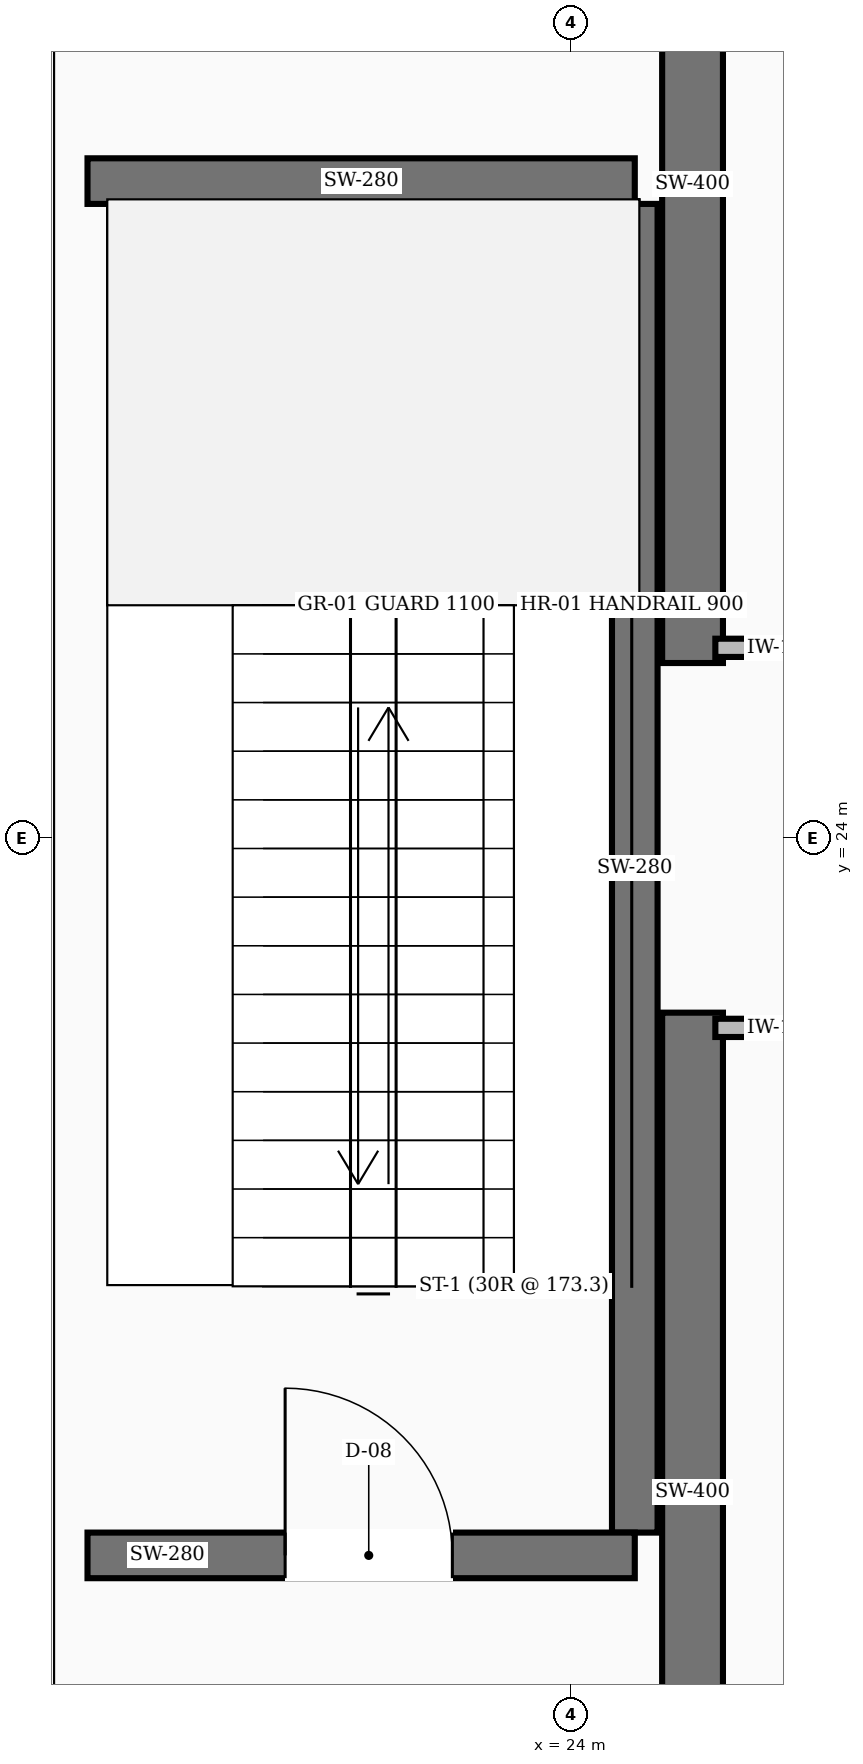
"""IFC4 building model, lengths in metres.
Left out: names, types, materials, properties, quantities, classifications, styles, units other than length and angle.
Written with IfcOpenShell. Run it as: python <this file> out.ifc"""

import sys

from ifc_helpers import new_model, si_unit, direction, frame, frame_2d, origin, place, context, subcontext, project, spatial, rectangle, extrude, element, fill, save


model = new_model("IFC4")
c1 = context("Model", 3, precision=1e-05, world=origin(), true_north=direction((0.0, 1.0)))
c2 = subcontext(c1, "Body", "Model", "MODEL_VIEW")
j1 = project(units=[si_unit("LENGTHUNIT", "METRE"), si_unit("PLANEANGLEUNIT", "RADIAN")], contexts=[c1])
p1 = place(None, origin())
s1 = spatial("IfcSite", under=j1, at=p1, CompositionType="ELEMENT")
p2 = place(p1, origin())
s2 = spatial("IfcBuilding", under=s1, at=p2, CompositionType="ELEMENT")
p3 = place(p2, frame((0.0, 0.0, -10.4)))
s3 = spatial("IfcBuildingStorey", under=s2, at=p3, CompositionType="ELEMENT", Elevation=-10.4)
for number, where, z_axis, x_axis in (
    (1, (24.8, 16.55, 0.0), (0.0, 0.0, 1.0), (0.0, 1.0, 0.0)),
    (2, (24.8, 25.15, 0.0), (0.0, 0.0, 1.0), (0.0, 1.0, 0.0)),
):
    element("IfcWall", number, at=place(p3, frame(where, z_axis=z_axis, x_axis=x_axis)), inside=s3, PredefinedType="SHEAR", context=c2, shape_type="SweptSolid", body=[
        extrude(rectangle(XDim=6.3, YDim=0.4, at=frame_2d((3.15, 0.0))), origin(), (0.0, 0.0, 1.0), 5.2),
    ])
for number, where, z_axis, x_axis in (
    (3, (20.82, 19.43, 0.0), (0.0, 0.0, 1.0), (0.0, 1.0, 0.0)),
    (4, (24.42, 19.43, 0.0), (0.0, 0.0, 1.0), (0.0, 1.0, 0.0)),
):
    element("IfcWall", number, at=place(p3, frame(where, z_axis=z_axis, x_axis=x_axis)), inside=s3, PredefinedType="SHEAR", context=c2, shape_type="SweptSolid", body=[
        extrude(rectangle(XDim=8.74, YDim=0.3, at=frame_2d((4.37, 0.0))), origin(), (0.0, 0.0, 1.0), 5.2),
    ])
p4 = place(p3, frame((20.82, 19.28, 0.0), z_axis=(0.0, 0.0, 1.0), x_axis=(1.0, 0.0, 0.0)))
e5 = element("IfcWall", 5, at=p4, inside=s3, PredefinedType="SHEAR", context=c2, shape_type="SweptSolid", body=[
    extrude(rectangle(XDim=3.6, YDim=0.3, at=frame_2d((1.8, 0.0))), origin(), (0.0, 0.0, 1.0), 5.2),
])
p5 = place(p4, frame((1.3, 0.0, 0.0)))
e6 = element("IfcOpeningElement", 6, at=p5, cuts=e5, PredefinedType="OPENING", context=c2, shape_type="SweptSolid", body=[
    extrude(rectangle(XDim=1.1, YDim=2.1, at=frame_2d((0.55, 1.05))), frame((0.0, 0.16, 0.0), z_axis=(0.0, -1.0, 0.0), x_axis=(1.0, 0.0, 0.0)), (0.0, 0.0, 1.0), 0.32),
])
p6 = place(p3, frame((20.82, 28.32, 0.0), z_axis=(0.0, 0.0, 1.0), x_axis=(1.0, 0.0, 0.0)))
e7 = element("IfcWall", 7, at=p6, inside=s3, PredefinedType="SHEAR", context=c2, shape_type="SweptSolid", body=[
    extrude(rectangle(XDim=3.6, YDim=0.3, at=frame_2d((1.8, 0.0))), origin(), (0.0, 0.0, 1.0), 5.2),
])
p7 = place(p3, frame((20.82, 16.55, 0.0), z_axis=(0.0, 0.0, 1.0), x_axis=(0.0, 1.0, 0.0)))
e8 = element("IfcWall", 8, at=p7, inside=s3, PredefinedType="SOLIDWALL", context=c2, shape_type="SweptSolid", body=[
    extrude(rectangle(XDim=2.73, YDim=0.2, at=frame_2d((1.365, 0.0))), origin(), (0.0, 0.0, 1.0), 3.9),
])
p8 = place(p7, frame((0.815, 0.0, 0.0)))
e9 = element("IfcOpeningElement", 9, at=p8, cuts=e8, PredefinedType="OPENING", context=c2, shape_type="SweptSolid", body=[
    extrude(rectangle(XDim=1.1, YDim=2.1, at=frame_2d((0.55, 1.05))), frame((0.0, 0.11, 0.0), z_axis=(0.0, -1.0, 0.0), x_axis=(1.0, 0.0, 0.0)), (0.0, 0.0, 1.0), 0.22),
])
p9 = place(p3, frame((20.82, 28.32, 0.0), z_axis=(0.0, 0.0, 1.0), x_axis=(0.0, 1.0, 0.0)))
e10 = element("IfcWall", 10, at=p9, inside=s3, PredefinedType="SOLIDWALL", context=c2, shape_type="SweptSolid", body=[
    extrude(rectangle(XDim=3.13, YDim=0.2, at=frame_2d((1.565, 0.0))), origin(), (0.0, 0.0, 1.0), 3.9),
])
p10 = place(p9, frame((1.09, 0.0, 0.0)))
e11 = element("IfcOpeningElement", 11, at=p10, cuts=e10, PredefinedType="OPENING", context=c2, shape_type="SweptSolid", body=[
    extrude(rectangle(XDim=0.95, YDim=2.1, at=frame_2d((0.475, 1.05))), frame((0.0, 0.11, 0.0), z_axis=(0.0, -1.0, 0.0), x_axis=(1.0, 0.0, 0.0)), (0.0, 0.0, 1.0), 0.22),
])
p11 = place(p3, frame((24.95, 25.25, 0.0), z_axis=(0.0, 0.0, 1.0), x_axis=(1.0, 0.0, 0.0)))
e12 = element("IfcWall", 12, at=p11, inside=s3, PredefinedType="PARTITIONING", context=c2, shape_type="SweptSolid", body=[
    extrude(rectangle(XDim=3.2, YDim=0.12, at=frame_2d((1.6, 0.0))), origin(), (0.0, 0.0, 1.0), 3.9),
])
p12 = place(p11, frame((1.125, 0.0, 0.0)))
e13 = element("IfcOpeningElement", 13, at=p12, cuts=e12, PredefinedType="OPENING", context=c2, shape_type="SweptSolid", body=[
    extrude(rectangle(XDim=0.95, YDim=2.1, at=frame_2d((0.475, 1.05))), frame((0.0, 0.07, 0.0), z_axis=(0.0, -1.0, 0.0), x_axis=(1.0, 0.0, 0.0)), (0.0, 0.0, 1.0), 0.14),
])
p13 = place(p3, frame((24.95, 22.75, 0.0), z_axis=(0.0, 0.0, 1.0), x_axis=(1.0, 0.0, 0.0)))
e14 = element("IfcWall", 14, at=p13, inside=s3, PredefinedType="PARTITIONING", context=c2, shape_type="SweptSolid", body=[
    extrude(rectangle(XDim=3.2, YDim=0.12, at=frame_2d((1.6, 0.0))), origin(), (0.0, 0.0, 1.0), 3.9),
])
p14 = place(p13, frame((1.125, 0.0, 0.0)))
e15 = element("IfcOpeningElement", 15, at=p14, cuts=e14, PredefinedType="OPENING", context=c2, shape_type="SweptSolid", body=[
    extrude(rectangle(XDim=0.95, YDim=2.1, at=frame_2d((0.475, 1.05))), frame((0.0, 0.07, 0.0), z_axis=(0.0, -1.0, 0.0), x_axis=(1.0, 0.0, 0.0)), (0.0, 0.0, 1.0), 0.14),
])
p15 = place(p5, origin())
e16 = element("IfcDoor", 16, at=p15, inside=s3, OperationType="SINGLE_SWING_LEFT", PredefinedType="DOOR", context=c2, shape_type="SweptSolid", body=[
    extrude(rectangle(XDim=1.1, YDim=2.1, at=frame_2d((0.55, 1.05))), frame((0.0, 0.025, 0.0), z_axis=(0.0, -1.0, 0.0), x_axis=(1.0, 0.0, 0.0)), (0.0, 0.0, 1.0), 0.05),
])
fill(e6, e16)
p16 = place(p8, origin())
e17 = element("IfcDoor", 17, at=p16, inside=s3, OperationType="SINGLE_SWING_LEFT", PredefinedType="DOOR", context=c2, shape_type="SweptSolid", body=[
    extrude(rectangle(XDim=1.1, YDim=2.1, at=frame_2d((0.55, 1.05))), frame((0.0, 0.025, 0.0), z_axis=(0.0, -1.0, 0.0), x_axis=(1.0, 0.0, 0.0)), (0.0, 0.0, 1.0), 0.05),
])
fill(e9, e17)
save(model, sys.argv[1])
